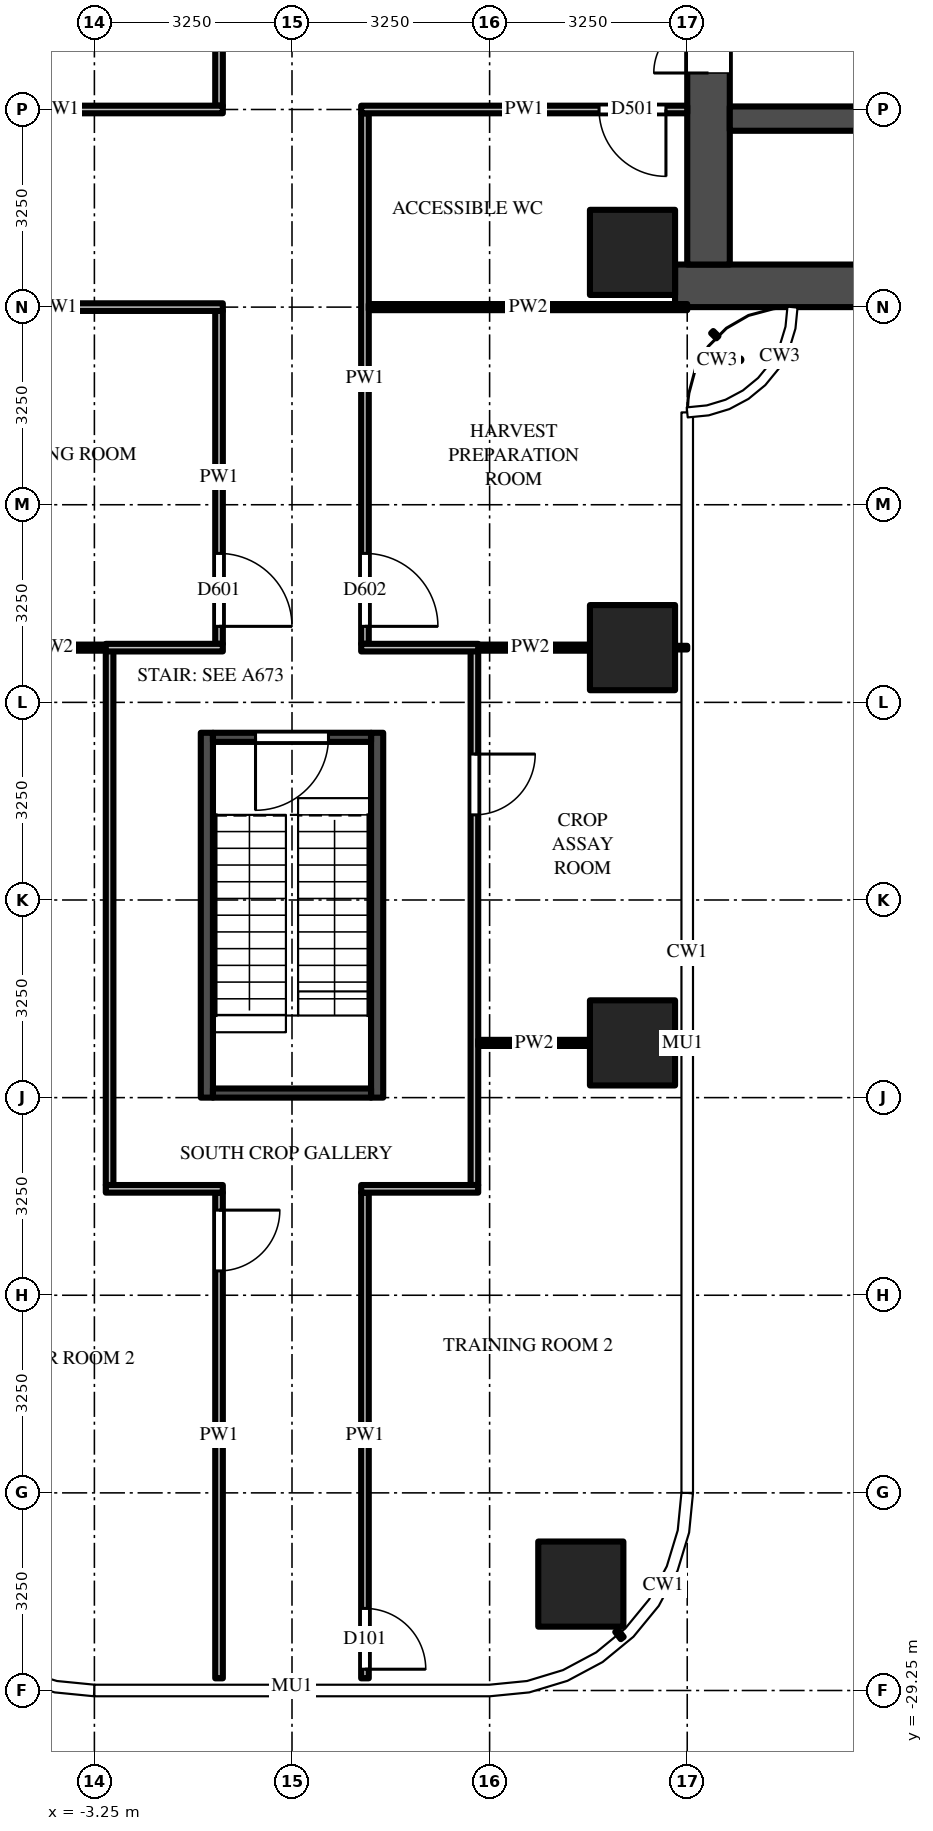
"""IFC4 building model, lengths in metres.
Left out: names, types, materials, properties, quantities, classifications, styles, units other than length and angle.
Written with IfcOpenShell. Run it as: python <this file> out.ifc"""

import sys

from ifc_helpers import new_model, si_unit, direction, frame, frame_2d, origin, origin_2d, place, context, subcontext, project, spatial, rectangle, extrude, source, transform, mapped, element, fill, save


model = new_model("IFC4")
c1 = context("Model", 3, precision=1e-05, world=origin(), true_north=direction((0.0, 1.0)))
c2 = subcontext(c1, "Body", "Model", "MODEL_VIEW")
j1 = project(units=[si_unit("LENGTHUNIT", "METRE"), si_unit("PLANEANGLEUNIT", "RADIAN")], contexts=[c1])
p1 = place(None, origin())
s1 = spatial("IfcSite", under=j1, at=p1, CompositionType="ELEMENT")
p2 = place(p1, origin())
s2 = spatial("IfcBuilding", under=s1, at=p2, CompositionType="ELEMENT")
p3 = place(p2, frame((0.0, 0.0, 65.5)))
s3 = spatial("IfcBuildingStorey", under=s2, at=p3, CompositionType="ELEMENT", Elevation=65.5)
m1 = source(origin(), c2, "Body", "SweptSolid", [
    extrude(rectangle(XDim=1.4, YDim=1.4, at=origin_2d()), origin(), (0.0, 0.0, 1.0), 4.5),
])
for number, where, z_axis, x_axis in (
    (1, (5.6, -5.6, 0.0), (0.0, 0.0, 1.0), (1.0, 0.0, 0.0)),
    (2, (5.6, -12.1, 0.0), (0.0, 0.0, 1.0), (1.0, 0.0, 0.0)),
    (3, (5.6, -18.6, 0.0), (0.0, 0.0, 1.0), (1.0, 0.0, 0.0)),
    (4, (4.75, -27.5, 0.0), (0.0, 0.0, 1.0), (1.0, 0.0, 0.0)),
):
    element("IfcColumn", number, at=place(p3, frame(where, z_axis=z_axis, x_axis=x_axis)), inside=s3, PredefinedType="COLUMN", context=c2, shape_type="MappedRepresentation", body=[
        mapped(m1, transform((0.0, 0.0, 0.0))),
    ])
m2 = source(origin(), c2, "Body", "SweptSolid", [
    extrude(rectangle(XDim=16.45, YDim=0.7, at=frame_2d((8.225, 0.0))), origin(), (0.0, 0.0, 1.0), 4.25),
])
p4 = place(p3, frame((6.3, -6.15, 0.0), z_axis=(0.0, 0.0, 1.0), x_axis=(1.0, 0.0, 0.0)))
e5 = element("IfcWall", 5, at=p4, inside=s3, PredefinedType="SHEAR", context=c2, shape_type="MappedRepresentation", body=[
    mapped(m2, transform((0.0, 0.0, 0.0))),
])
m3 = source(origin(), c2, "Body", "SweptSolid", [
    extrude(rectangle(XDim=9.05, YDim=0.7, at=frame_2d((4.525, 0.0))), origin(), (0.0, 0.0, 1.0), 4.25),
])
p5 = place(p3, frame((6.85, -5.8, 0.0), z_axis=(0.0, 0.0, 1.0), x_axis=(0.0, 1.0, 0.0)))
e6 = element("IfcWall", 6, at=p5, inside=s3, PredefinedType="SHEAR", context=c2, shape_type="MappedRepresentation", body=[
    mapped(m3, transform((0.0, 0.0, 0.0))),
])
m4 = source(origin(), c2, "Body", "SweptSolid", [
    extrude(rectangle(XDim=1.8, YDim=2.1, at=frame_2d((0.9, 1.05))), frame((0.0, 0.36, 0.0), z_axis=(0.0, -1.0, 0.0), x_axis=(1.0, 0.0, 0.0)), (0.0, 0.0, 1.0), 0.72),
])
p6 = place(p5, frame((3.15, 0.0, 0.0)))
e7 = element("IfcOpeningElement", 7, at=p6, cuts=e6, PredefinedType="OPENING", context=c2, shape_type="MappedRepresentation", body=[
    mapped(m4, transform((0.0, 0.0, 0.0))),
])
m5 = source(origin(), c2, "Body", "SweptSolid", [
    extrude(rectangle(XDim=7.5, YDim=0.4, at=frame_2d((3.75, 0.0))), origin(), (0.0, 0.0, 1.0), 4.25),
])
p7 = place(p3, frame((7.2, -3.4, 0.0), z_axis=(0.0, 0.0, 1.0), x_axis=(1.0, 0.0, 0.0)))
e8 = element("IfcWall", 8, at=p7, inside=s3, PredefinedType="SHEAR", context=c2, shape_type="MappedRepresentation", body=[
    mapped(m5, transform((0.0, 0.0, 0.0))),
])
m6 = source(origin(), c2, "Body", "SweptSolid", [
    extrude(rectangle(XDim=1.1, YDim=2.1, at=frame_2d((0.55, 1.05))), frame((0.0, 0.21, 0.0), z_axis=(0.0, -1.0, 0.0), x_axis=(1.0, 0.0, 0.0)), (0.0, 0.0, 1.0), 0.42),
])
p8 = place(p7, frame((3.0, 0.0, 0.0)))
e9 = element("IfcOpeningElement", 9, at=p8, cuts=e8, PredefinedType="OPENING", context=c2, shape_type="MappedRepresentation", body=[
    mapped(m6, transform((0.0, 0.0, 0.0))),
])
p9 = place(p7, frame((5.5, 0.0, 0.0)))
e10 = element("IfcOpeningElement", 10, at=p9, cuts=e8, PredefinedType="OPENING", context=c2, shape_type="MappedRepresentation", body=[
    mapped(m6, transform((0.0, 0.0, 0.0))),
])
m7 = source(origin(), c2, "Body", "SweptSolid", [
    extrude(rectangle(XDim=6.0, YDim=0.2, at=frame_2d((3.0, 0.0))), origin(), (0.0, 0.0, 1.0), 4.25),
])
for number, where, z_axis, x_axis in (
    (11, (1.4, -13.5, 0.0), (0.0, 0.0, 1.0), (0.0, -1.0, 0.0)),
    (12, (-1.4, -13.5, 0.0), (0.0, 0.0, 1.0), (0.0, -1.0, 0.0)),
):
    element("IfcWall", number, at=place(p3, frame(where, z_axis=z_axis, x_axis=x_axis)), inside=s3, PredefinedType="SHEAR", context=c2, shape_type="MappedRepresentation", body=[
        mapped(m7, transform((0.0, 0.0, 0.0))),
    ])
m8 = source(origin(), c2, "Body", "SweptSolid", [
    extrude(rectangle(XDim=2.6, YDim=0.15, at=frame_2d((1.3, 0.0))), origin(), (0.0, 0.0, 1.0), 4.25),
])
p10 = place(p3, frame((1.3, -13.575, 0.0), z_axis=(0.0, 0.0, 1.0), x_axis=(-1.0, 0.0, 0.0)))
e13 = element("IfcWall", 13, at=p10, inside=s3, PredefinedType="SHEAR", context=c2, shape_type="MappedRepresentation", body=[
    mapped(m8, transform((0.0, 0.0, 0.0))),
])
m9 = source(origin(), c2, "Body", "SweptSolid", [
    extrude(rectangle(XDim=1.2, YDim=2.1, at=frame_2d((0.6, 1.05))), frame((0.0, 0.085, 0.0), z_axis=(0.0, -1.0, 0.0), x_axis=(1.0, 0.0, 0.0)), (0.0, 0.0, 1.0), 0.17),
])
p11 = place(p10, frame((0.7, 0.0, 0.0)))
e14 = element("IfcOpeningElement", 14, at=p11, cuts=e13, PredefinedType="OPENING", context=c2, shape_type="MappedRepresentation", body=[
    mapped(m9, transform((0.0, 0.0, 0.0))),
])
p12 = place(p3, frame((1.3, -19.425, 0.0), z_axis=(0.0, 0.0, 1.0), x_axis=(-1.0, 0.0, 0.0)))
e15 = element("IfcWall", 15, at=p12, inside=s3, PredefinedType="SHEAR", context=c2, shape_type="MappedRepresentation", body=[
    mapped(m8, transform((0.0, 0.0, 0.0))),
])
m10 = source(origin(), c2, "Body", "SweptSolid", [
    extrude(rectangle(XDim=8.788, YDim=0.125, at=frame_2d((4.394, 0.0))), origin(), (0.0, 0.0, 1.0), 3.468),
])
p13 = place(p3, frame((-3.0, -20.938, 0.0), z_axis=(0.0, 0.0, 1.0), x_axis=(0.0, 1.0, 0.0)))
e16 = element("IfcWall", 16, at=p13, inside=s3, PredefinedType="PARTITIONING", context=c2, shape_type="MappedRepresentation", body=[
    mapped(m10, transform((0.0, 0.0, 0.0))),
])
m11 = source(origin(), c2, "Body", "SweptSolid", [
    extrude(rectangle(XDim=7.988, YDim=0.125, at=frame_2d((3.994, 0.0))), origin(), (0.0, 0.0, 1.0), 3.33),
])
p14 = place(p3, frame((-1.2, -21.062, 0.0), z_axis=(0.0, 0.0, 1.0), x_axis=(0.0, -1.0, 0.0)))
e17 = element("IfcWall", 17, at=p14, inside=s3, PredefinedType="PARTITIONING", context=c2, shape_type="MappedRepresentation", body=[
    mapped(m11, transform((0.0, 0.0, 0.0))),
])
m12 = source(origin(), c2, "Body", "SweptSolid", [
    extrude(rectangle(XDim=1.0, YDim=2.1, at=frame_2d((0.5, 1.05))), frame((0.0, 0.073, 0.0), z_axis=(0.0, -1.0, 0.0), x_axis=(1.0, 0.0, 0.0)), (0.0, 0.0, 1.0), 0.145),
])
p15 = place(p14, frame((0.288, 0.0, 0.0)))
e18 = element("IfcOpeningElement", 18, at=p15, cuts=e17, PredefinedType="OPENING", context=c2, shape_type="MappedRepresentation", body=[
    mapped(m12, transform((0.0, 0.0, 0.0))),
])
m13 = source(origin(), c2, "Body", "SweptSolid", [
    extrude(rectangle(XDim=5.475, YDim=0.125, at=frame_2d((2.738, 0.0))), origin(), (0.0, 0.0, 1.0), 3.468),
])
p16 = place(p3, frame((-1.2, -6.562, 0.0), z_axis=(0.0, 0.0, 1.0), x_axis=(0.0, -1.0, 0.0)))
e19 = element("IfcWall", 19, at=p16, inside=s3, PredefinedType="PARTITIONING", context=c2, shape_type="MappedRepresentation", body=[
    mapped(m13, transform((0.0, 0.0, 0.0))),
])
m14 = source(origin(), c2, "Body", "SweptSolid", [
    extrude(rectangle(XDim=1.2, YDim=2.1, at=frame_2d((0.6, 1.05))), frame((0.0, 0.073, 0.0), z_axis=(0.0, -1.0, 0.0), x_axis=(1.0, 0.0, 0.0)), (0.0, 0.0, 1.0), 0.145),
])
p17 = place(p16, frame((3.988, 0.0, 0.0)))
e20 = element("IfcOpeningElement", 20, at=p17, cuts=e19, PredefinedType="OPENING", context=c2, shape_type="MappedRepresentation", body=[
    mapped(m14, transform((0.0, 0.0, 0.0))),
])
m15 = source(origin(), c2, "Body", "SweptSolid", [
    extrude(rectangle(XDim=3.125, YDim=0.125, at=frame_2d((1.562, 0.0))), origin(), (0.0, 0.0, 1.0), 3.546),
])
p18 = place(p3, frame((-1.2, -0.062, 0.0), z_axis=(0.0, 0.0, 1.0), x_axis=(0.0, -1.0, 0.0)))
e21 = element("IfcWall", 21, at=p18, inside=s3, PredefinedType="PARTITIONING", context=c2, shape_type="MappedRepresentation", body=[
    mapped(m15, transform((0.0, 0.0, 0.0))),
])
p19 = place(p3, frame((1.2, -21.062, 0.0), z_axis=(0.0, 0.0, 1.0), x_axis=(0.0, -1.0, 0.0)))
e22 = element("IfcWall", 22, at=p19, inside=s3, PredefinedType="PARTITIONING", context=c2, shape_type="MappedRepresentation", body=[
    mapped(m11, transform((0.0, 0.0, 0.0))),
])
p20 = place(p19, frame((6.837, 0.0, 0.0)))
e23 = element("IfcOpeningElement", 23, at=p20, cuts=e22, PredefinedType="OPENING", context=c2, shape_type="MappedRepresentation", body=[
    mapped(m12, transform((0.0, 0.0, 0.0))),
])
m16 = source(origin(), c2, "Body", "SweptSolid", [
    extrude(rectangle(XDim=8.725, YDim=0.125, at=frame_2d((4.363, 0.0))), origin(), (0.0, 0.0, 1.0), 3.468),
])
p21 = place(p3, frame((1.2, -3.312, 0.0), z_axis=(0.0, 0.0, 1.0), x_axis=(0.0, -1.0, 0.0)))
e24 = element("IfcWall", 24, at=p21, inside=s3, PredefinedType="PARTITIONING", context=c2, shape_type="MappedRepresentation", body=[
    mapped(m16, transform((0.0, 0.0, 0.0))),
])
p22 = place(p21, frame((7.238, 0.0, 0.0)))
e25 = element("IfcOpeningElement", 25, at=p22, cuts=e24, PredefinedType="OPENING", context=c2, shape_type="MappedRepresentation", body=[
    mapped(m14, transform((0.0, 0.0, 0.0))),
])
p23 = place(p3, frame((3.0, -12.15, 0.0), z_axis=(0.0, 0.0, 1.0), x_axis=(0.0, -1.0, 0.0)))
e26 = element("IfcWall", 26, at=p23, inside=s3, PredefinedType="PARTITIONING", context=c2, shape_type="MappedRepresentation", body=[
    mapped(m10, transform((0.0, 0.0, 0.0))),
])
p24 = place(p23, frame((1.7, 0.0, 0.0)))
e27 = element("IfcOpeningElement", 27, at=p24, cuts=e26, PredefinedType="OPENING", context=c2, shape_type="MappedRepresentation", body=[
    mapped(m12, transform((0.0, 0.0, 0.0))),
])
m17 = source(origin(), c2, "Body", "SweptSolid", [
    extrude(rectangle(XDim=1.925, YDim=0.125, at=frame_2d((0.962, 0.0))), origin(), (0.0, 0.0, 1.0), 4.25),
])
for number, where, z_axis, x_axis in (
    (28, (-1.137, -21.0, 0.0), (0.0, 0.0, 1.0), (-1.0, 0.0, 0.0)),
    (29, (3.062, -21.0, 0.0), (0.0, 0.0, 1.0), (-1.0, 0.0, 0.0)),
):
    element("IfcWall", number, at=place(p3, frame(where, z_axis=z_axis, x_axis=x_axis)), inside=s3, PredefinedType="PARTITIONING", context=c2, shape_type="MappedRepresentation", body=[
        mapped(m17, transform((0.0, 0.0, 0.0))),
    ])
m18 = source(origin(), c2, "Body", "SweptSolid", [
    extrude(rectangle(XDim=1.837, YDim=0.1, at=frame_2d((0.919, 0.0))), origin(), (0.0, 0.0, 1.0), 3.697),
])
p25 = place(p3, frame((3.062, -18.6, 0.0), z_axis=(0.0, 0.0, 1.0), x_axis=(1.0, 0.0, 0.0)))
e30 = element("IfcWall", 30, at=p25, inside=s3, PredefinedType="PARTITIONING", context=c2, shape_type="MappedRepresentation", body=[
    mapped(m18, transform((0.0, 0.0, 0.0))),
])
m19 = source(origin(), c2, "Body", "SweptSolid", [
    extrude(rectangle(XDim=1.962, YDim=0.1, at=frame_2d((0.981, 0.0))), origin(), (0.0, 0.0, 1.0), 3.468),
])
for number, where, z_axis, x_axis in (
    (31, (-4.9, -12.1, 0.0), (0.0, 0.0, 1.0), (1.0, 0.0, 0.0)),
    (32, (2.938, -12.1, 0.0), (0.0, 0.0, 1.0), (1.0, 0.0, 0.0)),
):
    element("IfcWall", number, at=place(p3, frame(where, z_axis=z_axis, x_axis=x_axis)), inside=s3, PredefinedType="PARTITIONING", context=c2, shape_type="MappedRepresentation", body=[
        mapped(m19, transform((0.0, 0.0, 0.0))),
    ])
m20 = source(origin(), c2, "Body", "SweptSolid", [
    extrude(rectangle(XDim=1.925, YDim=0.125, at=frame_2d((0.962, 0.0))), origin(), (0.0, 0.0, 1.0), 3.468),
])
for number, where, z_axis, x_axis in (
    (33, (-3.062, -12.1, 0.0), (0.0, 0.0, 1.0), (1.0, 0.0, 0.0)),
    (34, (1.137, -12.1, 0.0), (0.0, 0.0, 1.0), (1.0, 0.0, 0.0)),
):
    element("IfcWall", number, at=place(p3, frame(where, z_axis=z_axis, x_axis=x_axis)), inside=s3, PredefinedType="PARTITIONING", context=c2, shape_type="MappedRepresentation", body=[
        mapped(m20, transform((0.0, 0.0, 0.0))),
    ])
m21 = source(origin(), c2, "Body", "SweptSolid", [
    extrude(rectangle(XDim=5.238, YDim=0.1, at=frame_2d((2.619, 0.0))), origin(), (0.0, 0.0, 1.0), 3.33),
])
p26 = place(p3, frame((1.262, -6.5, 0.0), z_axis=(0.0, 0.0, 1.0), x_axis=(1.0, 0.0, 0.0)))
e35 = element("IfcWall", 35, at=p26, inside=s3, PredefinedType="PARTITIONING", context=c2, shape_type="MappedRepresentation", body=[
    mapped(m21, transform((0.0, 0.0, 0.0))),
])
m22 = source(origin(), c2, "Body", "SweptSolid", [
    extrude(rectangle(XDim=5.425, YDim=0.125, at=frame_2d((2.712, 0.0))), origin(), (0.0, 0.0, 1.0), 3.33),
])
p27 = place(p3, frame((-1.137, -6.5, 0.0), z_axis=(0.0, 0.0, 1.0), x_axis=(-1.0, 0.0, 0.0)))
e36 = element("IfcWall", 36, at=p27, inside=s3, PredefinedType="PARTITIONING", context=c2, shape_type="MappedRepresentation", body=[
    mapped(m22, transform((0.0, 0.0, 0.0))),
])
m23 = source(origin(), c2, "Body", "SweptSolid", [
    extrude(rectangle(XDim=5.363, YDim=0.125, at=frame_2d((2.681, 0.0))), origin(), (0.0, 0.0, 1.0), 3.468),
])
p28 = place(p3, frame((-1.137, -3.25, 0.0), z_axis=(0.0, 0.0, 1.0), x_axis=(-1.0, 0.0, 0.0)))
e37 = element("IfcWall", 37, at=p28, inside=s3, PredefinedType="PARTITIONING", context=c2, shape_type="MappedRepresentation", body=[
    mapped(m23, transform((0.0, 0.0, 0.0))),
])
p29 = place(p28, frame((4.012, 0.0, 0.0)))
e38 = element("IfcOpeningElement", 38, at=p29, cuts=e37, PredefinedType="OPENING", context=c2, shape_type="MappedRepresentation", body=[
    mapped(m12, transform((0.0, 0.0, 0.0))),
])
p30 = place(p3, frame((6.5, -3.25, 0.0), z_axis=(0.0, 0.0, 1.0), x_axis=(-1.0, 0.0, 0.0)))
e39 = element("IfcWall", 39, at=p30, inside=s3, PredefinedType="PARTITIONING", context=c2, shape_type="MappedRepresentation", body=[
    mapped(m23, transform((0.0, 0.0, 0.0))),
])
m24 = source(origin(), c2, "Body", "SweptSolid", [
    extrude(rectangle(XDim=1.1, YDim=2.1, at=frame_2d((0.55, 1.05))), frame((0.0, 0.073, 0.0), z_axis=(0.0, -1.0, 0.0), x_axis=(1.0, 0.0, 0.0)), (0.0, 0.0, 1.0), 0.145),
])
p31 = place(p30, frame((0.35, 0.0, 0.0)))
e40 = element("IfcOpeningElement", 40, at=p31, cuts=e39, PredefinedType="OPENING", context=c2, shape_type="MappedRepresentation", body=[
    mapped(m24, transform((0.0, 0.0, 0.0))),
])
m25 = source(origin(), c2, "Body", "SweptSolid", [
    extrude(rectangle(XDim=1.8, YDim=2.1, at=frame_2d((0.9, 1.05))), frame((0.0, -0.275, 0.0), z_axis=(0.0, -1.0, 0.0), x_axis=(1.0, 0.0, 0.0)), (0.0, 0.0, 1.0), 0.05),
])
p32 = place(p6, origin())
e41 = element("IfcDoor", 41, at=p32, inside=s3, OperationType="DOUBLE_DOOR_SINGLE_SWING", PredefinedType="DOOR", context=c2, shape_type="MappedRepresentation", body=[
    mapped(m25, transform((0.0, 0.0, 0.0))),
])
fill(e7, e41)
m26 = source(origin(), c2, "Body", "SweptSolid", [
    extrude(rectangle(XDim=1.2, YDim=2.1, at=frame_2d((0.6, 1.05))), frame((0.0, 0.025, 0.0), z_axis=(0.0, -1.0, 0.0), x_axis=(1.0, 0.0, 0.0)), (0.0, 0.0, 1.0), 0.05),
])
p33 = place(p11, origin())
e42 = element("IfcDoor", 42, at=p33, inside=s3, OperationType="SINGLE_SWING_RIGHT", PredefinedType="DOOR", context=c2, shape_type="MappedRepresentation", body=[
    mapped(m26, transform((0.0, 0.0, 0.0))),
])
fill(e14, e42)
m27 = source(origin(), c2, "Body", "SweptSolid", [
    extrude(rectangle(XDim=1.0, YDim=2.1, at=frame_2d((0.5, 1.05))), frame((0.0, 0.025, 0.0), z_axis=(0.0, -1.0, 0.0), x_axis=(1.0, 0.0, 0.0)), (0.0, 0.0, 1.0), 0.05),
])
p34 = place(p20, origin())
e43 = element("IfcDoor", 43, at=p34, inside=s3, OperationType="SINGLE_SWING_RIGHT", PredefinedType="DOOR", context=c2, shape_type="MappedRepresentation", body=[
    mapped(m27, transform((0.0, 0.0, 0.0))),
])
fill(e23, e43)
p35 = place(p15, origin())
e44 = element("IfcDoor", 44, at=p35, inside=s3, OperationType="SINGLE_SWING_LEFT", PredefinedType="DOOR", context=c2, shape_type="MappedRepresentation", body=[
    mapped(m27, transform((0.0, 0.0, 0.0))),
])
fill(e18, e44)
p36 = place(p24, origin())
e45 = element("IfcDoor", 45, at=p36, inside=s3, OperationType="SINGLE_SWING_LEFT", PredefinedType="DOOR", context=c2, shape_type="MappedRepresentation", body=[
    mapped(m27, transform((0.0, 0.0, 0.0))),
])
fill(e27, e45)
p37 = place(p17, origin())
e46 = element("IfcDoor", 46, at=p37, inside=s3, OperationType="SINGLE_SWING_RIGHT", PredefinedType="DOOR", context=c2, shape_type="MappedRepresentation", body=[
    mapped(m26, transform((0.0, 0.0, 0.0))),
])
fill(e20, e46)
p38 = place(p22, origin())
e47 = element("IfcDoor", 47, at=p38, inside=s3, OperationType="SINGLE_SWING_RIGHT", PredefinedType="DOOR", context=c2, shape_type="MappedRepresentation", body=[
    mapped(m26, transform((0.0, 0.0, 0.0))),
])
fill(e25, e47)
m28 = source(origin(), c2, "Body", "SweptSolid", [
    extrude(rectangle(XDim=1.1, YDim=2.1, at=frame_2d((0.55, 1.05))), frame((0.0, 0.025, 0.0), z_axis=(0.0, -1.0, 0.0), x_axis=(1.0, 0.0, 0.0)), (0.0, 0.0, 1.0), 0.05),
])
p39 = place(p31, origin())
e48 = element("IfcDoor", 48, at=p39, inside=s3, OperationType="SINGLE_SWING_LEFT", PredefinedType="DOOR", context=c2, shape_type="MappedRepresentation", body=[
    mapped(m28, transform((0.0, 0.0, 0.0))),
])
fill(e40, e48)
save(model, sys.argv[1])
